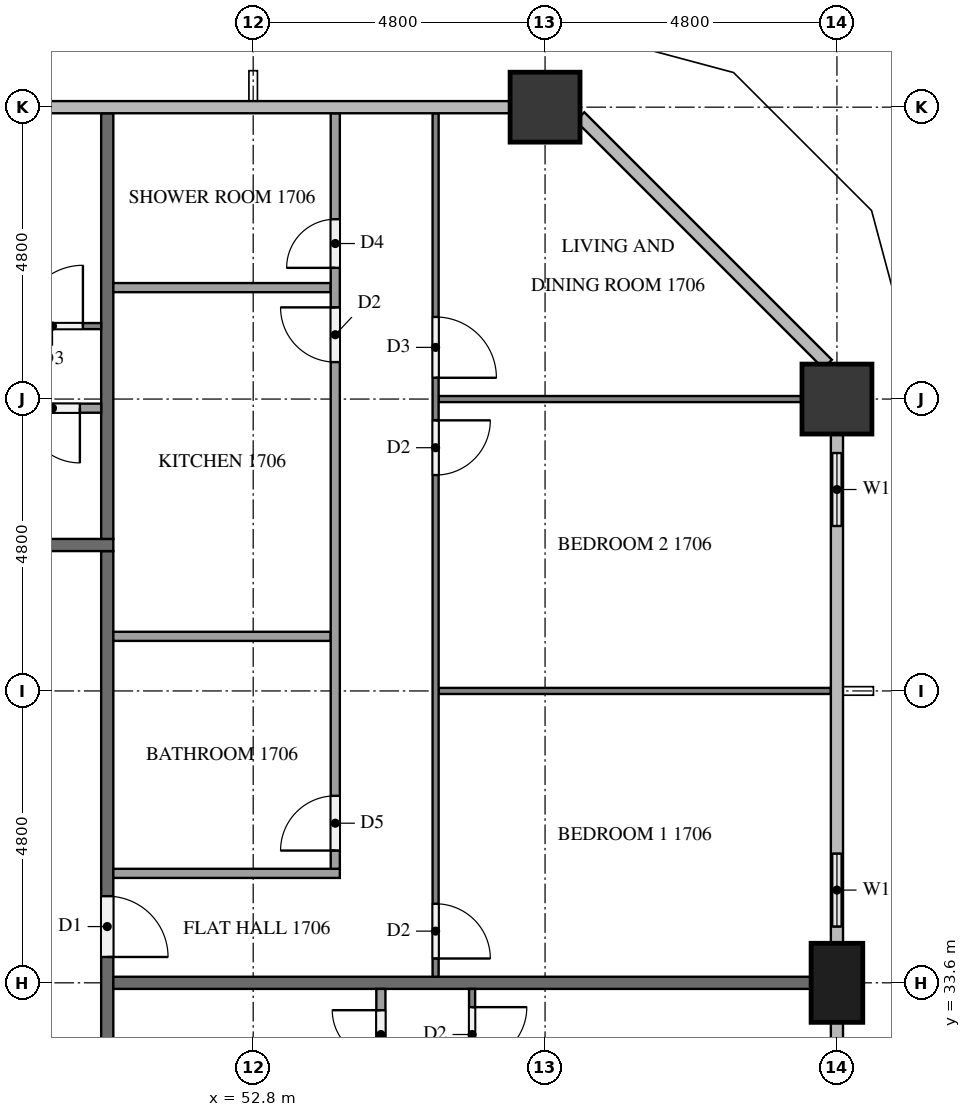
"""IFC4 building model, lengths in metres.
Left out: names, types, materials, properties, quantities, classifications, styles, units other than length and angle.
Written with IfcOpenShell. Run it as: python <this file> out.ifc"""

import sys

from ifc_helpers import new_model, si_unit, direction, frame, frame_2d, origin, origin_2d, place, context, subcontext, project, spatial, rectangle, extrude, element, fill, save


model = new_model("IFC4")
c1 = context("Model", 3, precision=1e-05, world=origin(), true_north=direction((0.0, 1.0)))
c2 = subcontext(c1, "Body", "Model", "MODEL_VIEW")
j1 = project(units=[si_unit("LENGTHUNIT", "METRE"), si_unit("PLANEANGLEUNIT", "RADIAN")], contexts=[c1])
p1 = place(None, origin())
s1 = spatial("IfcSite", under=j1, at=p1, CompositionType="ELEMENT")
p2 = place(p1, origin())
s2 = spatial("IfcBuilding", under=s1, at=p2, CompositionType="ELEMENT")
p3 = place(p2, frame((0.0, 0.0, 69.8)))
s3 = spatial("IfcBuildingStorey", under=s2, at=p3, CompositionType="ELEMENT", Elevation=69.8)
p4 = place(p3, frame((62.4, 33.6, 0.0), z_axis=(0.0, 0.0, 1.0), x_axis=(0.0, 1.0, 0.0)))
e1 = element("IfcColumn", 1, at=p4, inside=s3, PredefinedType="COLUMN", context=c2, shape_type="SweptSolid", body=[
    extrude(rectangle(XDim=1.3, YDim=0.85, at=origin_2d()), origin(), (0.0, 0.0, 1.0), 3.2),
])
for number, where, z_axis, x_axis in (
    (2, (62.4, 43.2, 0.0), (0.0, 0.0, 1.0), (1.0, 0.0, 0.0)),
    (3, (57.6, 48.0, 0.0), (0.0, 0.0, 1.0), (1.0, 0.0, 0.0)),
):
    element("IfcColumn", number, at=place(p3, frame(where, z_axis=z_axis, x_axis=x_axis)), inside=s3, PredefinedType="COLUMN", context=c2, shape_type="SweptSolid", body=[
        extrude(rectangle(XDim=1.15, YDim=1.15, at=origin_2d()), origin(), (0.0, 0.0, 1.0), 3.2),
    ])
p5 = place(p3, frame((62.4, 31.2, 0.0), z_axis=(0.0, 0.0, 1.0), x_axis=(0.0, 1.0, 0.0)))
e4 = element("IfcWall", 4, at=p5, inside=s3, PredefinedType="SOLIDWALL", context=c2, shape_type="SweptSolid", body=[
    extrude(rectangle(XDim=1.75, YDim=0.15, at=frame_2d((0.875, 0.0))), origin(), (0.0, 0.0, 1.0), 3.2),
])
p6 = place(p5, frame((0.275, 0.0, 0.9)))
e5 = element("IfcOpeningElement", 5, at=p6, cuts=e4, PredefinedType="OPENING", context=c2, shape_type="SweptSolid", body=[
    extrude(rectangle(XDim=1.2, YDim=1.4, at=frame_2d((0.6, 0.7))), frame((0.0, 0.085, 0.0), z_axis=(0.0, -1.0, 0.0), x_axis=(1.0, 0.0, 0.0)), (0.0, 0.0, 1.0), 0.17),
])
p7 = place(p3, frame((62.4, 34.25, 0.0), z_axis=(0.0, 0.0, 1.0), x_axis=(0.0, 1.0, 0.0)))
e6 = element("IfcWall", 6, at=p7, inside=s3, PredefinedType="SOLIDWALL", context=c2, shape_type="SweptSolid", body=[
    extrude(rectangle(XDim=1.75, YDim=0.15, at=frame_2d((0.875, 0.0))), origin(), (0.0, 0.0, 1.0), 3.2),
])
p8 = place(p7, frame((0.275, 0.0, 0.9)))
e7 = element("IfcOpeningElement", 7, at=p8, cuts=e6, PredefinedType="OPENING", context=c2, shape_type="SweptSolid", body=[
    extrude(rectangle(XDim=1.2, YDim=1.4, at=frame_2d((0.6, 0.7))), frame((0.0, 0.085, 0.0), z_axis=(0.0, -1.0, 0.0), x_axis=(1.0, 0.0, 0.0)), (0.0, 0.0, 1.0), 0.17),
])
p9 = place(p3, frame((62.4, 40.8, 0.0), z_axis=(0.0, 0.0, 1.0), x_axis=(0.0, 1.0, 0.0)))
e8 = element("IfcWall", 8, at=p9, inside=s3, PredefinedType="SOLIDWALL", context=c2, shape_type="SweptSolid", body=[
    extrude(rectangle(XDim=1.825, YDim=0.15, at=frame_2d((0.913, 0.0))), origin(), (0.0, 0.0, 1.0), 3.2),
])
p10 = place(p9, frame((0.312, 0.0, 0.9)))
e9 = element("IfcOpeningElement", 9, at=p10, cuts=e8, PredefinedType="OPENING", context=c2, shape_type="SweptSolid", body=[
    extrude(rectangle(XDim=1.2, YDim=1.4, at=frame_2d((0.6, 0.7))), frame((0.0, 0.085, 0.0), z_axis=(0.0, -1.0, 0.0), x_axis=(1.0, 0.0, 0.0)), (0.0, 0.0, 1.0), 0.17),
])
p11 = place(p3, frame((50.4, 40.7, 0.0), z_axis=(0.0, 0.0, 1.0), x_axis=(0.0, -1.0, 0.0)))
e10 = element("IfcWall", 10, at=p11, inside=s3, PredefinedType="PARTITIONING", context=c2, shape_type="SweptSolid", body=[
    extrude(rectangle(XDim=28.6, YDim=0.2, at=frame_2d((14.3, 0.0))), origin(), (0.0, 0.0, 1.0), 3.2),
])
p12 = place(p11, frame((21.875, 0.0, 0.0)))
e11 = element("IfcOpeningElement", 11, at=p12, cuts=e10, PredefinedType="OPENING", context=c2, shape_type="SweptSolid", body=[
    extrude(rectangle(XDim=1.1, YDim=2.1, at=frame_2d((0.55, 1.05))), frame((0.0, 0.11, 0.0), z_axis=(0.0, -1.0, 0.0), x_axis=(1.0, 0.0, 0.0)), (0.0, 0.0, 1.0), 0.22),
])
p13 = place(p11, frame((20.075, 0.0, 0.0)))
e12 = element("IfcOpeningElement", 12, at=p13, cuts=e10, PredefinedType="OPENING", context=c2, shape_type="SweptSolid", body=[
    extrude(rectangle(XDim=1.0, YDim=2.1, at=frame_2d((0.5, 1.05))), frame((0.0, 0.11, 0.0), z_axis=(0.0, -1.0, 0.0), x_axis=(1.0, 0.0, 0.0)), (0.0, 0.0, 1.0), 0.22),
])
p14 = place(p11, frame((5.675, 0.0, 0.0)))
e13 = element("IfcOpeningElement", 13, at=p14, cuts=e10, PredefinedType="OPENING", context=c2, shape_type="SweptSolid", body=[
    extrude(rectangle(XDim=1.0, YDim=2.1, at=frame_2d((0.5, 1.05))), frame((0.0, 0.11, 0.0), z_axis=(0.0, -1.0, 0.0), x_axis=(1.0, 0.0, 0.0)), (0.0, 0.0, 1.0), 0.22),
])
p15 = place(p3, frame((11.9, 40.8, 0.0), z_axis=(0.0, 0.0, 1.0), x_axis=(1.0, 0.0, 0.0)))
e14 = element("IfcWall", 14, at=p15, inside=s3, PredefinedType="PARTITIONING", context=c2, shape_type="SweptSolid", body=[
    extrude(rectangle(XDim=38.6, YDim=0.2, at=frame_2d((19.3, 0.0))), origin(), (0.0, 0.0, 1.0), 3.2),
])
p16 = place(p15, frame((22.125, 0.0, 0.0)))
e15 = element("IfcOpeningElement", 15, at=p16, cuts=e14, PredefinedType="OPENING", context=c2, shape_type="SweptSolid", body=[
    extrude(rectangle(XDim=1.0, YDim=2.1, at=frame_2d((0.5, 1.05))), frame((0.0, 0.11, 0.0), z_axis=(0.0, -1.0, 0.0), x_axis=(1.0, 0.0, 0.0)), (0.0, 0.0, 1.0), 0.22),
])
p17 = place(p15, frame((7.725, 0.0, 0.0)))
e16 = element("IfcOpeningElement", 16, at=p17, cuts=e14, PredefinedType="OPENING", context=c2, shape_type="SweptSolid", body=[
    extrude(rectangle(XDim=1.0, YDim=2.1, at=frame_2d((0.5, 1.05))), frame((0.0, 0.11, 0.0), z_axis=(0.0, -1.0, 0.0), x_axis=(1.0, 0.0, 0.0)), (0.0, 0.0, 1.0), 0.22),
])
p18 = place(p15, frame((5.875, 0.0, 0.0)))
e17 = element("IfcOpeningElement", 17, at=p18, cuts=e14, PredefinedType="OPENING", context=c2, shape_type="SweptSolid", body=[
    extrude(rectangle(XDim=1.0, YDim=2.1, at=frame_2d((0.5, 1.05))), frame((0.0, 0.11, 0.0), z_axis=(0.0, -1.0, 0.0), x_axis=(1.0, 0.0, 0.0)), (0.0, 0.0, 1.0), 0.22),
])
p19 = place(p3, frame((50.5, 33.6, 0.0), z_axis=(0.0, 0.0, 1.0), x_axis=(1.0, 0.0, 0.0)))
e18 = element("IfcWall", 18, at=p19, inside=s3, PredefinedType="PARTITIONING", context=c2, shape_type="SweptSolid", body=[
    extrude(rectangle(XDim=11.475, YDim=0.2, at=frame_2d((5.738, 0.0))), origin(), (0.0, 0.0, 1.0), 3.2),
])
p20 = place(p3, frame((50.4, 40.9, 0.0), z_axis=(0.0, 0.0, 1.0), x_axis=(0.0, 1.0, 0.0)))
e19 = element("IfcWall", 19, at=p20, inside=s3, PredefinedType="PARTITIONING", context=c2, shape_type="SweptSolid", body=[
    extrude(rectangle(XDim=7.0, YDim=0.2, at=frame_2d((3.5, 0.0))), origin(), (0.0, 0.0, 1.0), 3.2),
])
p21 = place(p3, frame((56.4, 33.5, 0.0), z_axis=(0.0, 0.0, 1.0), x_axis=(0.0, -1.0, 0.0)))
e20 = element("IfcWall", 20, at=p21, inside=s3, PredefinedType="PARTITIONING", context=c2, shape_type="SweptSolid", body=[
    extrude(rectangle(XDim=14.2, YDim=0.1, at=frame_2d((7.1, 0.0))), origin(), (0.0, 0.0, 1.0), 3.2),
])
p22 = place(p21, frame((9.85, 0.0, 0.0)))
e21 = element("IfcOpeningElement", 21, at=p22, cuts=e20, PredefinedType="OPENING", context=c2, shape_type="SweptSolid", body=[
    extrude(rectangle(XDim=0.9, YDim=2.1, at=frame_2d((0.45, 1.05))), frame((0.0, 0.06, 0.0), z_axis=(0.0, -1.0, 0.0), x_axis=(1.0, 0.0, 0.0)), (0.0, 0.0, 1.0), 0.12),
])
p23 = place(p21, frame((8.15, 0.0, 0.0)))
e22 = element("IfcOpeningElement", 22, at=p23, cuts=e20, PredefinedType="OPENING", context=c2, shape_type="SweptSolid", body=[
    extrude(rectangle(XDim=1.0, YDim=2.1, at=frame_2d((0.5, 1.05))), frame((0.0, 0.06, 0.0), z_axis=(0.0, -1.0, 0.0), x_axis=(1.0, 0.0, 0.0)), (0.0, 0.0, 1.0), 0.12),
])
p24 = place(p21, frame((0.3, 0.0, 0.0)))
e23 = element("IfcOpeningElement", 23, at=p24, cuts=e20, PredefinedType="OPENING", context=c2, shape_type="SweptSolid", body=[
    extrude(rectangle(XDim=0.9, YDim=2.1, at=frame_2d((0.45, 1.05))), frame((0.0, 0.06, 0.0), z_axis=(0.0, -1.0, 0.0), x_axis=(1.0, 0.0, 0.0)), (0.0, 0.0, 1.0), 0.12),
])
p25 = place(p3, frame((54.9, 21.075, 0.0), z_axis=(0.0, 0.0, 1.0), x_axis=(0.0, 1.0, 0.0)))
e24 = element("IfcWall", 24, at=p25, inside=s3, PredefinedType="PARTITIONING", context=c2, shape_type="SweptSolid", body=[
    extrude(rectangle(XDim=12.425, YDim=0.15, at=frame_2d((6.212, 0.0))), origin(), (0.0, 0.0, 1.0), 3.2),
])
p26 = place(p25, frame((4.51, 0.0, 0.0)))
e25 = element("IfcOpeningElement", 25, at=p26, cuts=e24, PredefinedType="OPENING", context=c2, shape_type="SweptSolid", body=[
    extrude(rectangle(XDim=0.9, YDim=2.1, at=frame_2d((0.45, 1.05))), frame((0.0, 0.085, 0.0), z_axis=(0.0, -1.0, 0.0), x_axis=(1.0, 0.0, 0.0)), (0.0, 0.0, 1.0), 0.17),
])
p27 = place(p25, frame((6.06, 0.0, 0.0)))
e26 = element("IfcOpeningElement", 26, at=p27, cuts=e24, PredefinedType="OPENING", context=c2, shape_type="SweptSolid", body=[
    extrude(rectangle(XDim=0.9, YDim=2.1, at=frame_2d((0.45, 1.05))), frame((0.0, 0.085, 0.0), z_axis=(0.0, -1.0, 0.0), x_axis=(1.0, 0.0, 0.0)), (0.0, 0.0, 1.0), 0.17),
])
p28 = place(p25, frame((11.275, 0.0, 0.0)))
e27 = element("IfcOpeningElement", 27, at=p28, cuts=e24, PredefinedType="OPENING", context=c2, shape_type="SweptSolid", body=[
    extrude(rectangle(XDim=0.8, YDim=2.1, at=frame_2d((0.4, 1.05))), frame((0.0, 0.085, 0.0), z_axis=(0.0, -1.0, 0.0), x_axis=(1.0, 0.0, 0.0)), (0.0, 0.0, 1.0), 0.17),
])
p29 = place(p3, frame((55.85, 38.4, 0.0), z_axis=(0.0, 0.0, 1.0), x_axis=(1.0, 0.0, 0.0)))
e28 = element("IfcWall", 28, at=p29, inside=s3, PredefinedType="PARTITIONING", context=c2, shape_type="SweptSolid", body=[
    extrude(rectangle(XDim=6.45, YDim=0.1, at=frame_2d((3.225, 0.0))), origin(), (0.0, 0.0, 1.0), 3.2),
])
p30 = place(p3, frame((55.85, 43.2, 0.0), z_axis=(0.0, 0.0, 1.0), x_axis=(1.0, 0.0, 0.0)))
e29 = element("IfcWall", 29, at=p30, inside=s3, PredefinedType="PARTITIONING", context=c2, shape_type="SweptSolid", body=[
    extrude(rectangle(XDim=5.975, YDim=0.1, at=frame_2d((2.987, 0.0))), origin(), (0.0, 0.0, 1.0), 3.2),
])
p31 = place(p3, frame((55.8, 47.9, 0.0), z_axis=(0.0, 0.0, 1.0), x_axis=(0.0, -1.0, 0.0)))
e30 = element("IfcWall", 30, at=p31, inside=s3, PredefinedType="PARTITIONING", context=c2, shape_type="SweptSolid", body=[
    extrude(rectangle(XDim=14.2, YDim=0.1, at=frame_2d((7.1, 0.0))), origin(), (0.0, 0.0, 1.0), 3.2),
])
p32 = place(p31, frame((13.0, 0.0, 0.0)))
e31 = element("IfcOpeningElement", 31, at=p32, cuts=e30, PredefinedType="OPENING", context=c2, shape_type="SweptSolid", body=[
    extrude(rectangle(XDim=0.9, YDim=2.1, at=frame_2d((0.45, 1.05))), frame((0.0, 0.06, 0.0), z_axis=(0.0, -1.0, 0.0), x_axis=(1.0, 0.0, 0.0)), (0.0, 0.0, 1.0), 0.12),
])
p33 = place(p31, frame((5.05, 0.0, 0.0)))
e32 = element("IfcOpeningElement", 32, at=p33, cuts=e30, PredefinedType="OPENING", context=c2, shape_type="SweptSolid", body=[
    extrude(rectangle(XDim=0.9, YDim=2.1, at=frame_2d((0.45, 1.05))), frame((0.0, 0.06, 0.0), z_axis=(0.0, -1.0, 0.0), x_axis=(1.0, 0.0, 0.0)), (0.0, 0.0, 1.0), 0.12),
])
p34 = place(p31, frame((3.35, 0.0, 0.0)))
e33 = element("IfcOpeningElement", 33, at=p34, cuts=e30, PredefinedType="OPENING", context=c2, shape_type="SweptSolid", body=[
    extrude(rectangle(XDim=1.0, YDim=2.1, at=frame_2d((0.5, 1.05))), frame((0.0, 0.06, 0.0), z_axis=(0.0, -1.0, 0.0), x_axis=(1.0, 0.0, 0.0)), (0.0, 0.0, 1.0), 0.12),
])
for number, where, z_axis, x_axis in (
    (34, (50.5, 39.298, 0.0), (0.0, 0.0, 1.0), (1.0, 0.0, 0.0)),
    (35, (50.5, 45.033, 0.0), (0.0, 0.0, 1.0), (1.0, 0.0, 0.0)),
):
    element("IfcWall", number, at=place(p3, frame(where, z_axis=z_axis, x_axis=x_axis)), inside=s3, PredefinedType="PARTITIONING", context=c2, shape_type="SweptSolid", body=[
        extrude(rectangle(XDim=3.575, YDim=0.15, at=frame_2d((1.788, 0.0))), origin(), (0.0, 0.0, 1.0), 3.2),
    ])
p35 = place(p3, frame((50.5, 35.4, 0.0), z_axis=(0.0, 0.0, 1.0), x_axis=(1.0, 0.0, 0.0)))
e36 = element("IfcWall", 36, at=p35, inside=s3, PredefinedType="PARTITIONING", context=c2, shape_type="SweptSolid", body=[
    extrude(rectangle(XDim=3.725, YDim=0.15, at=frame_2d((1.863, 0.0))), origin(), (0.0, 0.0, 1.0), 3.2),
])
p36 = place(p3, frame((54.15, 35.475, 0.0), z_axis=(0.0, 0.0, 1.0), x_axis=(0.0, 1.0, 0.0)))
e37 = element("IfcWall", 37, at=p36, inside=s3, PredefinedType="PARTITIONING", context=c2, shape_type="SweptSolid", body=[
    extrude(rectangle(XDim=12.425, YDim=0.15, at=frame_2d((6.212, 0.0))), origin(), (0.0, 0.0, 1.0), 3.2),
])
p37 = place(p36, frame((0.3, 0.0, 0.0)))
e38 = element("IfcOpeningElement", 38, at=p37, cuts=e37, PredefinedType="OPENING", context=c2, shape_type="SweptSolid", body=[
    extrude(rectangle(XDim=0.9, YDim=2.1, at=frame_2d((0.45, 1.05))), frame((0.0, 0.085, 0.0), z_axis=(0.0, -1.0, 0.0), x_axis=(1.0, 0.0, 0.0)), (0.0, 0.0, 1.0), 0.17),
])
p38 = place(p36, frame((8.333, 0.0, 0.0)))
e39 = element("IfcOpeningElement", 39, at=p38, cuts=e37, PredefinedType="OPENING", context=c2, shape_type="SweptSolid", body=[
    extrude(rectangle(XDim=0.9, YDim=2.1, at=frame_2d((0.45, 1.05))), frame((0.0, 0.085, 0.0), z_axis=(0.0, -1.0, 0.0), x_axis=(1.0, 0.0, 0.0)), (0.0, 0.0, 1.0), 0.17),
])
p39 = place(p36, frame((9.883, 0.0, 0.0)))
e40 = element("IfcOpeningElement", 40, at=p39, cuts=e37, PredefinedType="OPENING", context=c2, shape_type="SweptSolid", body=[
    extrude(rectangle(XDim=0.8, YDim=2.1, at=frame_2d((0.4, 1.05))), frame((0.0, 0.085, 0.0), z_axis=(0.0, -1.0, 0.0), x_axis=(1.0, 0.0, 0.0)), (0.0, 0.0, 1.0), 0.17),
])
p40 = place(p3, frame((33.7, 44.4, 0.0), z_axis=(0.0, 0.0, 1.0), x_axis=(1.0, 0.0, 0.0)))
e41 = element("IfcWall", 41, at=p40, inside=s3, PredefinedType="PARTITIONING", context=c2, shape_type="SweptSolid", body=[
    extrude(rectangle(XDim=16.6, YDim=0.1, at=frame_2d((8.3, 0.0))), origin(), (0.0, 0.0, 1.0), 3.2),
])
p41 = place(p40, frame((3.45, 0.0, 0.0)))
e42 = element("IfcOpeningElement", 42, at=p41, cuts=e41, PredefinedType="OPENING", context=c2, shape_type="SweptSolid", body=[
    extrude(rectangle(XDim=0.9, YDim=2.1, at=frame_2d((0.45, 1.05))), frame((0.0, 0.06, 0.0), z_axis=(0.0, -1.0, 0.0), x_axis=(1.0, 0.0, 0.0)), (0.0, 0.0, 1.0), 0.12),
])
p42 = place(p40, frame((5.05, 0.0, 0.0)))
e43 = element("IfcOpeningElement", 43, at=p42, cuts=e41, PredefinedType="OPENING", context=c2, shape_type="SweptSolid", body=[
    extrude(rectangle(XDim=0.9, YDim=2.1, at=frame_2d((0.45, 1.05))), frame((0.0, 0.06, 0.0), z_axis=(0.0, -1.0, 0.0), x_axis=(1.0, 0.0, 0.0)), (0.0, 0.0, 1.0), 0.12),
])
p43 = place(p40, frame((15.3, 0.0, 0.0)))
e44 = element("IfcOpeningElement", 44, at=p43, cuts=e41, PredefinedType="OPENING", context=c2, shape_type="SweptSolid", body=[
    extrude(rectangle(XDim=1.0, YDim=2.1, at=frame_2d((0.5, 1.05))), frame((0.0, 0.06, 0.0), z_axis=(0.0, -1.0, 0.0), x_axis=(1.0, 0.0, 0.0)), (0.0, 0.0, 1.0), 0.12),
])
p44 = place(p3, frame((50.3, 43.05, 0.0), z_axis=(0.0, 0.0, 1.0), x_axis=(-1.0, 0.0, 0.0)))
e45 = element("IfcWall", 45, at=p44, inside=s3, PredefinedType="PARTITIONING", context=c2, shape_type="SweptSolid", body=[
    extrude(rectangle(XDim=14.825, YDim=0.15, at=frame_2d((7.413, 0.0))), origin(), (0.0, 0.0, 1.0), 3.2),
])
p45 = place(p44, frame((11.729, 0.0, 0.0)))
e46 = element("IfcOpeningElement", 46, at=p45, cuts=e45, PredefinedType="OPENING", context=c2, shape_type="SweptSolid", body=[
    extrude(rectangle(XDim=0.8, YDim=2.1, at=frame_2d((0.4, 1.05))), frame((0.0, 0.085, 0.0), z_axis=(0.0, -1.0, 0.0), x_axis=(1.0, 0.0, 0.0)), (0.0, 0.0, 1.0), 0.17),
])
p46 = place(p44, frame((10.179, 0.0, 0.0)))
e47 = element("IfcOpeningElement", 47, at=p46, cuts=e45, PredefinedType="OPENING", context=c2, shape_type="SweptSolid", body=[
    extrude(rectangle(XDim=0.9, YDim=2.1, at=frame_2d((0.45, 1.05))), frame((0.0, 0.085, 0.0), z_axis=(0.0, -1.0, 0.0), x_axis=(1.0, 0.0, 0.0)), (0.0, 0.0, 1.0), 0.17),
])
p47 = place(p44, frame((0.35, 0.0, 0.0)))
e48 = element("IfcOpeningElement", 48, at=p47, cuts=e45, PredefinedType="OPENING", context=c2, shape_type="SweptSolid", body=[
    extrude(rectangle(XDim=0.9, YDim=2.1, at=frame_2d((0.45, 1.05))), frame((0.0, 0.085, 0.0), z_axis=(0.0, -1.0, 0.0), x_axis=(1.0, 0.0, 0.0)), (0.0, 0.0, 1.0), 0.17),
])
p48 = place(p8, origin())
e49 = element("IfcWindow", 49, at=p48, inside=s3, PartitioningType="SINGLE_PANEL", PredefinedType="WINDOW", context=c2, shape_type="SweptSolid", body=[
    extrude(rectangle(XDim=1.2, YDim=1.4, at=frame_2d((0.6, 0.7))), frame((0.0, 0.03, 0.0), z_axis=(0.0, -1.0, 0.0), x_axis=(1.0, 0.0, 0.0)), (0.0, 0.0, 1.0), 0.06),
])
fill(e7, e49)
p49 = place(p10, origin())
e50 = element("IfcWindow", 50, at=p49, inside=s3, PartitioningType="SINGLE_PANEL", PredefinedType="WINDOW", context=c2, shape_type="SweptSolid", body=[
    extrude(rectangle(XDim=1.2, YDim=1.4, at=frame_2d((0.6, 0.7))), frame((0.0, 0.03, 0.0), z_axis=(0.0, -1.0, 0.0), x_axis=(1.0, 0.0, 0.0)), (0.0, 0.0, 1.0), 0.06),
])
fill(e9, e50)
p50 = place(p14, origin())
e51 = element("IfcDoor", 51, at=p50, inside=s3, OperationType="SINGLE_SWING_RIGHT", PredefinedType="DOOR", context=c2, shape_type="SweptSolid", body=[
    extrude(rectangle(XDim=1.0, YDim=2.1, at=frame_2d((0.5, 1.05))), frame((0.0, 0.025, 0.0), z_axis=(0.0, -1.0, 0.0), x_axis=(1.0, 0.0, 0.0)), (0.0, 0.0, 1.0), 0.05),
])
fill(e13, e51)
p51 = place(p24, origin())
e52 = element("IfcDoor", 52, at=p51, inside=s3, OperationType="SINGLE_SWING_LEFT", PredefinedType="DOOR", context=c2, shape_type="SweptSolid", body=[
    extrude(rectangle(XDim=0.9, YDim=2.1, at=frame_2d((0.45, 1.05))), frame((0.0, 0.025, 0.0), z_axis=(0.0, -1.0, 0.0), x_axis=(1.0, 0.0, 0.0)), (0.0, 0.0, 1.0), 0.05),
])
fill(e23, e52)
p52 = place(p28, origin())
e53 = element("IfcDoor", 53, at=p52, inside=s3, OperationType="SINGLE_SWING_RIGHT", PredefinedType="DOOR", context=c2, shape_type="SweptSolid", body=[
    extrude(rectangle(XDim=0.8, YDim=2.1, at=frame_2d((0.4, 1.05))), frame((0.0, 0.025, 0.0), z_axis=(0.0, -1.0, 0.0), x_axis=(1.0, 0.0, 0.0)), (0.0, 0.0, 1.0), 0.05),
])
fill(e27, e53)
p53 = place(p32, origin())
e54 = element("IfcDoor", 54, at=p53, inside=s3, OperationType="SINGLE_SWING_RIGHT", PredefinedType="DOOR", context=c2, shape_type="SweptSolid", body=[
    extrude(rectangle(XDim=0.9, YDim=2.1, at=frame_2d((0.45, 1.05))), frame((0.0, 0.025, 0.0), z_axis=(0.0, -1.0, 0.0), x_axis=(1.0, 0.0, 0.0)), (0.0, 0.0, 1.0), 0.05),
])
fill(e31, e54)
p54 = place(p33, origin())
e55 = element("IfcDoor", 55, at=p54, inside=s3, OperationType="SINGLE_SWING_LEFT", PredefinedType="DOOR", context=c2, shape_type="SweptSolid", body=[
    extrude(rectangle(XDim=0.9, YDim=2.1, at=frame_2d((0.45, 1.05))), frame((0.0, 0.025, 0.0), z_axis=(0.0, -1.0, 0.0), x_axis=(1.0, 0.0, 0.0)), (0.0, 0.0, 1.0), 0.05),
])
fill(e32, e55)
p55 = place(p34, origin())
e56 = element("IfcDoor", 56, at=p55, inside=s3, OperationType="SINGLE_SWING_RIGHT", PredefinedType="DOOR", context=c2, shape_type="SweptSolid", body=[
    extrude(rectangle(XDim=1.0, YDim=2.1, at=frame_2d((0.5, 1.05))), frame((0.0, 0.025, 0.0), z_axis=(0.0, -1.0, 0.0), x_axis=(1.0, 0.0, 0.0)), (0.0, 0.0, 1.0), 0.05),
])
fill(e33, e56)
p56 = place(p37, origin())
e57 = element("IfcDoor", 57, at=p56, inside=s3, OperationType="SINGLE_SWING_LEFT", PredefinedType="DOOR", context=c2, shape_type="SweptSolid", body=[
    extrude(rectangle(XDim=0.9, YDim=2.1, at=frame_2d((0.45, 1.05))), frame((0.0, 0.025, 0.0), z_axis=(0.0, -1.0, 0.0), x_axis=(1.0, 0.0, 0.0)), (0.0, 0.0, 1.0), 0.05),
])
fill(e38, e57)
p57 = place(p38, origin())
e58 = element("IfcDoor", 58, at=p57, inside=s3, OperationType="SINGLE_SWING_RIGHT", PredefinedType="DOOR", context=c2, shape_type="SweptSolid", body=[
    extrude(rectangle(XDim=0.9, YDim=2.1, at=frame_2d((0.45, 1.05))), frame((0.0, 0.025, 0.0), z_axis=(0.0, -1.0, 0.0), x_axis=(1.0, 0.0, 0.0)), (0.0, 0.0, 1.0), 0.05),
])
fill(e39, e58)
p58 = place(p39, origin())
e59 = element("IfcDoor", 59, at=p58, inside=s3, OperationType="SINGLE_SWING_LEFT", PredefinedType="DOOR", context=c2, shape_type="SweptSolid", body=[
    extrude(rectangle(XDim=0.8, YDim=2.1, at=frame_2d((0.4, 1.05))), frame((0.0, 0.025, 0.0), z_axis=(0.0, -1.0, 0.0), x_axis=(1.0, 0.0, 0.0)), (0.0, 0.0, 1.0), 0.05),
])
fill(e40, e59)
p59 = place(p43, origin())
e60 = element("IfcDoor", 60, at=p59, inside=s3, OperationType="SINGLE_SWING_RIGHT", PredefinedType="DOOR", context=c2, shape_type="SweptSolid", body=[
    extrude(rectangle(XDim=1.0, YDim=2.1, at=frame_2d((0.5, 1.05))), frame((0.0, 0.025, 0.0), z_axis=(0.0, -1.0, 0.0), x_axis=(1.0, 0.0, 0.0)), (0.0, 0.0, 1.0), 0.05),
])
fill(e44, e60)
p60 = place(p47, origin())
e61 = element("IfcDoor", 61, at=p60, inside=s3, OperationType="SINGLE_SWING_LEFT", PredefinedType="DOOR", context=c2, shape_type="SweptSolid", body=[
    extrude(rectangle(XDim=0.9, YDim=2.1, at=frame_2d((0.45, 1.05))), frame((0.0, 0.025, 0.0), z_axis=(0.0, -1.0, 0.0), x_axis=(1.0, 0.0, 0.0)), (0.0, 0.0, 1.0), 0.05),
])
fill(e48, e61)
save(model, sys.argv[1])
